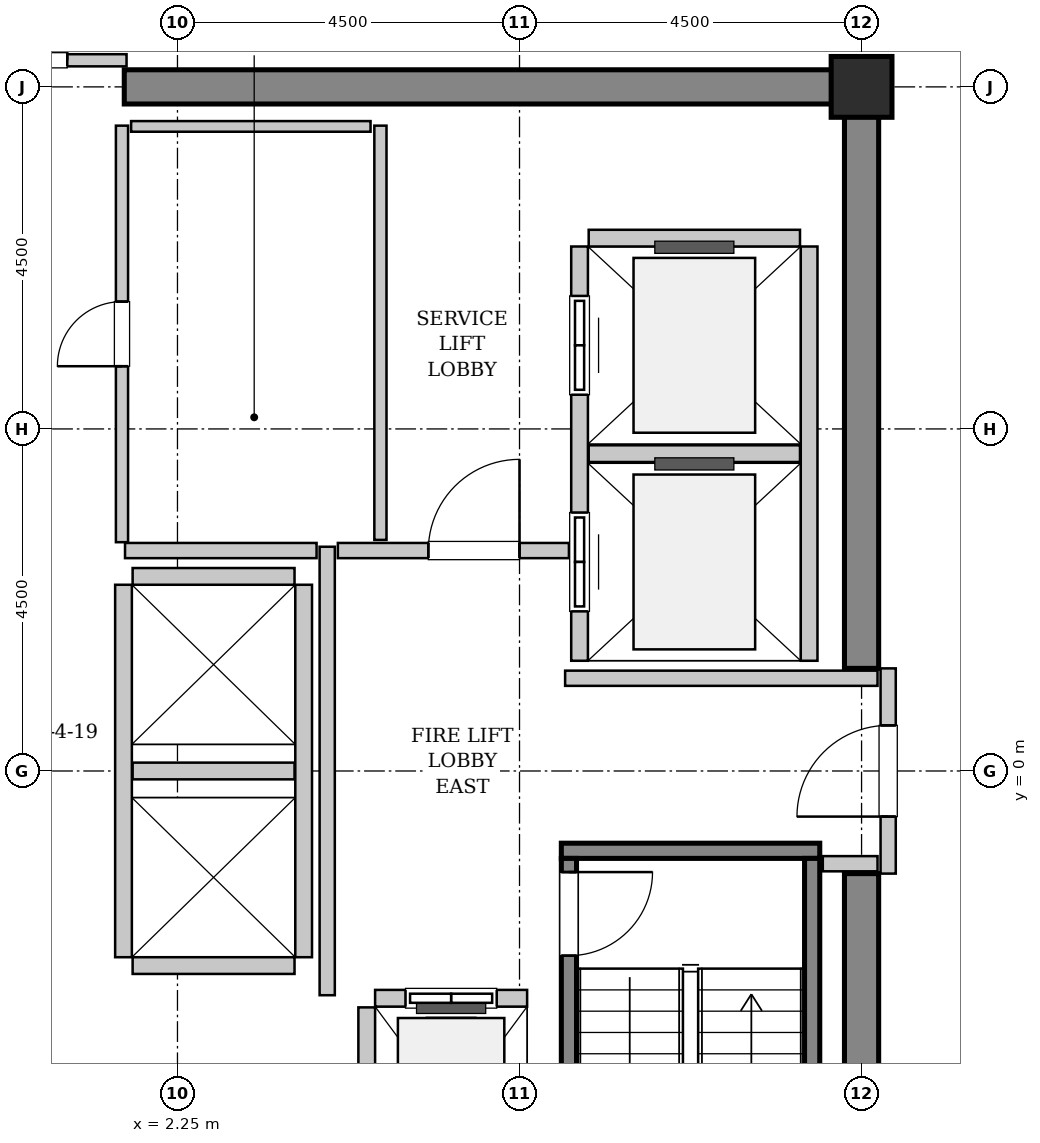
"""IFC4 building model, lengths in metres.
Left out: names, types, materials, properties, quantities, classifications, styles, units other than length and angle.
Written with IfcOpenShell. Run it as: python <this file> out.ifc"""

import sys

from ifc_helpers import new_model, si_unit, direction, frame, frame_2d, origin, origin_2d, place, context, subcontext, project, spatial, rectangle, hollow_rectangle, extrude, source, transform, mapped, element, fill, save


model = new_model("IFC4")
c1 = context("Model", 3, precision=1e-05, world=origin(), true_north=direction((0.0, 1.0)))
c2 = subcontext(c1, "Body", "Model", "MODEL_VIEW")
j1 = project(units=[si_unit("LENGTHUNIT", "METRE"), si_unit("PLANEANGLEUNIT", "RADIAN")], contexts=[c1])
p1 = place(None, origin())
s1 = spatial("IfcSite", under=j1, at=p1, CompositionType="ELEMENT")
p2 = place(p1, origin())
s2 = spatial("IfcBuilding", under=s1, at=p2, CompositionType="ELEMENT")
p3 = place(p2, frame((0.0, 0.0, 240.8)))
s3 = spatial("IfcBuildingStorey", under=s2, at=p3, CompositionType="ELEMENT", Elevation=240.8)
m1 = source(origin(), c2, "Body", "SweptSolid", [
    extrude(rectangle(XDim=9.925, YDim=0.45, at=frame_2d((4.962, 0.0))), origin(), (0.0, 0.0, 1.0), 3.8),
])
p4 = place(p3, frame((1.55, 9.0, 0.0), z_axis=(0.0, 0.0, 1.0), x_axis=(1.0, 0.0, 0.0)))
e1 = element("IfcWall", 1, at=p4, inside=s3, PredefinedType="SHEAR", context=c2, shape_type="MappedRepresentation", body=[
    mapped(m1, transform((0.0, 0.0, 0.0), x_axis=(1.0, 0.0, 0.0), y_axis=(0.0, 1.0, 0.0), z_axis=(0.0, 0.0, 1.0), scale=1.0)),
])
m2 = source(origin(), c2, "Body", "SweptSolid", [
    extrude(rectangle(XDim=7.425, YDim=0.45, at=frame_2d((3.712, 0.0))), origin(), (0.0, 0.0, 1.0), 3.8),
])
for number, where, z_axis, x_axis in (
    (2, (11.25, -8.775, 0.0), (0.0, 0.0, 1.0), (0.0, 1.0, 0.0)),
    (3, (11.25, 1.35, 0.0), (0.0, 0.0, 1.0), (0.0, 1.0, 0.0)),
):
    element("IfcWall", number, at=place(p3, frame(where, z_axis=z_axis, x_axis=x_axis)), inside=s3, PredefinedType="SHEAR", context=c2, shape_type="MappedRepresentation", body=[
        mapped(m2, transform((0.0, 0.0, 0.0), x_axis=(1.0, 0.0, 0.0), y_axis=(0.0, 1.0, 0.0), z_axis=(0.0, 0.0, 1.0), scale=1.0)),
    ])
m3 = source(origin(), c2, "Body", "SweptSolid", [
    extrude(hollow_rectangle(XDim=0.8, YDim=0.8, WallThickness=0.04, InnerFilletRadius=0.04, OuterFilletRadius=0.08, at=origin_2d()), origin(), (0.0, 0.0, 1.0), 3.8),
])
p5 = place(p3, frame((11.25, 9.0, 0.0), z_axis=(0.0, 0.0, 1.0), x_axis=(1.0, 0.0, 0.0)))
e4 = element("IfcColumn", 4, at=p5, inside=s3, PredefinedType="COLUMN", context=c2, shape_type="MappedRepresentation", body=[
    mapped(m3, transform((0.0, 0.0, 0.0), x_axis=(1.0, 0.0, 0.0), y_axis=(0.0, 1.0, 0.0), z_axis=(0.0, 0.0, 1.0), scale=1.0)),
])
m4 = source(origin(), c2, "Body", "SweptSolid", [
    extrude(rectangle(XDim=3.4, YDim=0.2, at=frame_2d((1.7, 0.0))), origin(), (0.0, 0.0, 1.0), 3.8),
])
p6 = place(p3, frame((7.3, -1.05, 0.0), z_axis=(0.0, 0.0, 1.0), x_axis=(1.0, 0.0, 0.0)))
e5 = element("IfcWall", 5, at=p6, inside=s3, PredefinedType="SOLIDWALL", context=c2, shape_type="MappedRepresentation", body=[
    mapped(m4, transform((0.0, 0.0, 0.0), x_axis=(1.0, 0.0, 0.0), y_axis=(0.0, 1.0, 0.0), z_axis=(0.0, 0.0, 1.0), scale=1.0)),
])
m5 = source(origin(), c2, "Body", "SweptSolid", [
    extrude(rectangle(XDim=7.1, YDim=0.2, at=frame_2d((3.55, 0.0))), origin(), (0.0, 0.0, 1.0), 3.8),
])
p7 = place(p3, frame((7.4, -1.15, 0.0), z_axis=(0.0, 0.0, 1.0), x_axis=(0.0, -1.0, 0.0)))
e6 = element("IfcWall", 6, at=p7, inside=s3, PredefinedType="SOLIDWALL", context=c2, shape_type="MappedRepresentation", body=[
    mapped(m5, transform((0.0, 0.0, 0.0), x_axis=(1.0, 0.0, 0.0), y_axis=(0.0, 1.0, 0.0), z_axis=(0.0, 0.0, 1.0), scale=1.0)),
])
p8 = place(p7, frame((0.18, 0.0, 0.0)))
e7 = element("IfcOpeningElement", 7, at=p8, cuts=e6, PredefinedType="OPENING", context=c2, shape_type="SweptSolid", body=[
    extrude(rectangle(XDim=1.1, YDim=2.15, at=frame_2d((0.55, 1.075))), frame((0.0, 0.11, 0.0), z_axis=(0.0, -1.0, 0.0), x_axis=(1.0, 0.0, 0.0)), (0.0, 0.0, 1.0), 0.22),
])
p9 = place(p3, frame((10.6, -1.15, 0.0), z_axis=(0.0, 0.0, 1.0), x_axis=(0.0, -1.0, 0.0)))
e8 = element("IfcWall", 8, at=p9, inside=s3, PredefinedType="SOLIDWALL", context=c2, shape_type="MappedRepresentation", body=[
    mapped(m5, transform((0.0, 0.0, 0.0), x_axis=(1.0, 0.0, 0.0), y_axis=(0.0, 1.0, 0.0), z_axis=(0.0, 0.0, 1.0), scale=1.0)),
])
m6 = source(origin(), c2, "Body", "SweptSolid", [
    extrude(rectangle(XDim=2.0, YDim=0.22, at=frame_2d((1.0, 0.0))), origin(), (0.0, 0.0, 1.0), 3.535),
])
p10 = place(p3, frame((6.85, -2.99, 0.0), z_axis=(0.0, 0.0, 1.0), x_axis=(-1.0, 0.0, 0.0)))
e9 = element("IfcWall", 9, at=p10, inside=s3, PredefinedType="SOLIDWALL", context=c2, shape_type="MappedRepresentation", body=[
    mapped(m6, transform((0.0, 0.0, 0.0), x_axis=(1.0, 0.0, 0.0), y_axis=(0.0, 1.0, 0.0), z_axis=(0.0, 0.0, 1.0), scale=1.0)),
])
p11 = place(p10, frame((0.4, 0.0, 0.0)))
e10 = element("IfcOpeningElement", 10, at=p11, cuts=e9, PredefinedType="OPENING", context=c2, shape_type="SweptSolid", body=[
    extrude(rectangle(XDim=1.2, YDim=2.2, at=frame_2d((0.6, 1.1))), frame((0.0, 0.12, 0.0), z_axis=(0.0, -1.0, 0.0), x_axis=(1.0, 0.0, 0.0)), (0.0, 0.0, 1.0), 0.24),
])
m7 = source(origin(), c2, "Body", "SweptSolid", [
    extrude(rectangle(XDim=2.68, YDim=0.22, at=frame_2d((1.34, 0.0))), origin(), (0.0, 0.0, 1.0), 3.535),
])
p12 = place(p3, frame((4.74, -3.11, 0.0), z_axis=(0.0, 0.0, 1.0), x_axis=(0.0, -1.0, 0.0)))
e11 = element("IfcWall", 11, at=p12, inside=s3, PredefinedType="SOLIDWALL", context=c2, shape_type="MappedRepresentation", body=[
    mapped(m7, transform((0.0, 0.0, 0.0), x_axis=(1.0, 0.0, 0.0), y_axis=(0.0, 1.0, 0.0), z_axis=(0.0, 0.0, 1.0), scale=1.0)),
])
m8 = source(origin(), c2, "Body", "SweptSolid", [
    extrude(rectangle(XDim=5.45, YDim=0.22, at=frame_2d((2.725, 0.0))), origin(), (0.0, 0.0, 1.0), 3.535),
])
p13 = place(p3, frame((7.54, 6.9, 0.0), z_axis=(0.0, 0.0, 1.0), x_axis=(0.0, -1.0, 0.0)))
e12 = element("IfcWall", 12, at=p13, inside=s3, PredefinedType="SOLIDWALL", context=c2, shape_type="MappedRepresentation", body=[
    mapped(m8, transform((0.0, 0.0, 0.0), x_axis=(1.0, 0.0, 0.0), y_axis=(0.0, 1.0, 0.0), z_axis=(0.0, 0.0, 1.0), scale=1.0)),
])
p14 = place(p13, frame((3.5, 0.0, 0.0)))
e13 = element("IfcOpeningElement", 13, at=p14, cuts=e12, PredefinedType="OPENING", context=c2, shape_type="SweptSolid", body=[
    extrude(rectangle(XDim=1.3, YDim=2.3, at=frame_2d((0.65, 1.15))), frame((0.0, 0.12, 0.0), z_axis=(0.0, -1.0, 0.0), x_axis=(1.0, 0.0, 0.0)), (0.0, 0.0, 1.0), 0.24),
])
p15 = place(p13, frame((0.65, 0.0, 0.0)))
e14 = element("IfcOpeningElement", 14, at=p15, cuts=e12, PredefinedType="OPENING", context=c2, shape_type="SweptSolid", body=[
    extrude(rectangle(XDim=1.3, YDim=2.3, at=frame_2d((0.65, 1.15))), frame((0.0, 0.12, 0.0), z_axis=(0.0, -1.0, 0.0), x_axis=(1.0, 0.0, 0.0)), (0.0, 0.0, 1.0), 0.24),
])
p16 = place(p3, frame((10.56, 1.45, 0.0), z_axis=(0.0, 0.0, 1.0), x_axis=(0.0, 1.0, 0.0)))
e15 = element("IfcWall", 15, at=p16, inside=s3, PredefinedType="SOLIDWALL", context=c2, shape_type="MappedRepresentation", body=[
    mapped(m8, transform((0.0, 0.0, 0.0), x_axis=(1.0, 0.0, 0.0), y_axis=(0.0, 1.0, 0.0), z_axis=(0.0, 0.0, 1.0), scale=1.0)),
])
m9 = source(origin(), c2, "Body", "SweptSolid", [
    extrude(rectangle(XDim=2.78, YDim=0.22, at=frame_2d((1.39, 0.0))), origin(), (0.0, 0.0, 1.0), 3.535),
])
for number, where, z_axis, x_axis in (
    (16, (7.66, 4.175, 0.0), (0.0, 0.0, 1.0), (1.0, 0.0, 0.0)),
    (17, (10.44, 7.01, 0.0), (0.0, 0.0, 1.0), (-1.0, 0.0, 0.0)),
):
    element("IfcWall", number, at=place(p3, frame(where, z_axis=z_axis, x_axis=x_axis)), inside=s3, PredefinedType="SOLIDWALL", context=c2, shape_type="MappedRepresentation", body=[
        mapped(m9, transform((0.0, 0.0, 0.0), x_axis=(1.0, 0.0, 0.0), y_axis=(0.0, 1.0, 0.0), z_axis=(0.0, 0.0, 1.0), scale=1.0)),
    ])
m10 = source(origin(), c2, "Body", "SweptSolid", [
    extrude(rectangle(XDim=4.9, YDim=0.22, at=frame_2d((2.45, 0.0))), origin(), (0.0, 0.0, 1.0), 3.535),
])
for number, where, z_axis, x_axis in (
    (18, (1.54, 2.45, 0.0), (0.0, 0.0, 1.0), (0.0, -1.0, 0.0)),
    (19, (3.91, -2.45, 0.0), (0.0, 0.0, 1.0), (0.0, 1.0, 0.0)),
):
    element("IfcWall", number, at=place(p3, frame(where, z_axis=z_axis, x_axis=x_axis)), inside=s3, PredefinedType="SOLIDWALL", context=c2, shape_type="MappedRepresentation", body=[
        mapped(m10, transform((0.0, 0.0, 0.0), x_axis=(1.0, 0.0, 0.0), y_axis=(0.0, 1.0, 0.0), z_axis=(0.0, 0.0, 1.0), scale=1.0)),
    ])
m11 = source(origin(), c2, "Body", "SweptSolid", [
    extrude(rectangle(XDim=2.13, YDim=0.22, at=frame_2d((1.065, 0.0))), origin(), (0.0, 0.0, 1.0), 3.535),
])
for number, where, z_axis, x_axis in (
    (20, (1.66, -2.56, 0.0), (0.0, 0.0, 1.0), (1.0, 0.0, 0.0)),
    (21, (1.66, 0.0, 0.0), (0.0, 0.0, 1.0), (1.0, 0.0, 0.0)),
    (22, (3.79, 2.56, 0.0), (0.0, 0.0, 1.0), (-1.0, 0.0, 0.0)),
):
    element("IfcWall", number, at=place(p3, frame(where, z_axis=z_axis, x_axis=x_axis)), inside=s3, PredefinedType="SOLIDWALL", context=c2, shape_type="MappedRepresentation", body=[
        mapped(m11, transform((0.0, 0.0, 0.0), x_axis=(1.0, 0.0, 0.0), y_axis=(0.0, 1.0, 0.0), z_axis=(0.0, 0.0, 1.0), scale=1.0)),
    ])
m12 = source(origin(), c2, "Body", "SweptSolid", [
    extrude(rectangle(XDim=2.7, YDim=0.2, at=frame_2d((1.35, 0.0))), origin(), (0.0, 0.0, 1.0), 2.625),
])
p17 = place(p3, frame((11.6, -1.35, 0.0), z_axis=(0.0, 0.0, 1.0), x_axis=(0.0, 1.0, 0.0)))
e23 = element("IfcWall", 23, at=p17, inside=s3, PredefinedType="PARTITIONING", context=c2, shape_type="MappedRepresentation", body=[
    mapped(m12, transform((0.0, 0.0, 0.0), x_axis=(1.0, 0.0, 0.0), y_axis=(0.0, 1.0, 0.0), z_axis=(0.0, 0.0, 1.0), scale=1.0)),
])
p18 = place(p17, frame((0.75, 0.0, 0.0)))
e24 = element("IfcOpeningElement", 24, at=p18, cuts=e23, PredefinedType="OPENING", context=c2, shape_type="SweptSolid", body=[
    extrude(rectangle(XDim=1.2, YDim=2.15, at=frame_2d((0.6, 1.075))), frame((0.0, 0.11, 0.0), z_axis=(0.0, -1.0, 0.0), x_axis=(1.0, 0.0, 0.0)), (0.0, 0.0, 1.0), 0.22),
])
m13 = source(origin(), c2, "Body", "SweptSolid", [
    extrude(rectangle(XDim=5.9, YDim=0.2, at=frame_2d((2.95, 0.0))), origin(), (0.0, 0.0, 1.0), 3.535),
])
p19 = place(p3, frame((4.22, -2.95, 0.0), z_axis=(0.0, 0.0, 1.0), x_axis=(0.0, 1.0, 0.0)))
e25 = element("IfcWall", 25, at=p19, inside=s3, PredefinedType="PARTITIONING", context=c2, shape_type="MappedRepresentation", body=[
    mapped(m13, transform((0.0, 0.0, 0.0), x_axis=(1.0, 0.0, 0.0), y_axis=(0.0, 1.0, 0.0), z_axis=(0.0, 0.0, 1.0), scale=1.0)),
])
m14 = source(origin(), c2, "Body", "SweptSolid", [
    extrude(rectangle(XDim=2.52, YDim=0.2, at=frame_2d((1.26, 0.0))), origin(), (0.0, 0.0, 1.0), 3.535),
])
p20 = place(p3, frame((1.56, 2.9, 0.0), z_axis=(0.0, 0.0, 1.0), x_axis=(1.0, 0.0, 0.0)))
e26 = element("IfcWall", 26, at=p20, inside=s3, PredefinedType="PARTITIONING", context=c2, shape_type="MappedRepresentation", body=[
    mapped(m14, transform((0.0, 0.0, 0.0), x_axis=(1.0, 0.0, 0.0), y_axis=(0.0, 1.0, 0.0), z_axis=(0.0, 0.0, 1.0), scale=1.0)),
])
m15 = source(origin(), c2, "Body", "SweptSolid", [
    extrude(rectangle(XDim=3.04, YDim=0.2, at=frame_2d((1.52, 0.0))), origin(), (0.0, 0.0, 1.0), 3.535),
])
p21 = place(p3, frame((4.36, 2.9, 0.0), z_axis=(0.0, 0.0, 1.0), x_axis=(1.0, 0.0, 0.0)))
e27 = element("IfcWall", 27, at=p21, inside=s3, PredefinedType="PARTITIONING", context=c2, shape_type="MappedRepresentation", body=[
    mapped(m15, transform((0.0, 0.0, 0.0), x_axis=(1.0, 0.0, 0.0), y_axis=(0.0, 1.0, 0.0), z_axis=(0.0, 0.0, 1.0), scale=1.0)),
])
p22 = place(p21, frame((1.19, 0.0, 0.0)))
e28 = element("IfcOpeningElement", 28, at=p22, cuts=e27, PredefinedType="OPENING", context=c2, shape_type="SweptSolid", body=[
    extrude(rectangle(XDim=1.2, YDim=2.15, at=frame_2d((0.6, 1.075))), frame((0.0, 0.11, 0.0), z_axis=(0.0, -1.0, 0.0), x_axis=(1.0, 0.0, 0.0)), (0.0, 0.0, 1.0), 0.22),
])
m16 = source(origin(), c2, "Body", "SweptSolid", [
    extrude(rectangle(XDim=4.11, YDim=0.2, at=frame_2d((2.055, 0.0))), origin(), (0.0, 0.0, 1.0), 3.535),
])
p23 = place(p3, frame((7.35, 1.22, 0.0), z_axis=(0.0, 0.0, 1.0), x_axis=(1.0, 0.0, 0.0)))
e29 = element("IfcWall", 29, at=p23, inside=s3, PredefinedType="PARTITIONING", context=c2, shape_type="MappedRepresentation", body=[
    mapped(m16, transform((0.0, 0.0, 0.0), x_axis=(1.0, 0.0, 0.0), y_axis=(0.0, 1.0, 0.0), z_axis=(0.0, 0.0, 1.0), scale=1.0)),
])
m17 = source(origin(), c2, "Body", "SweptSolid", [
    extrude(rectangle(XDim=0.72, YDim=0.2, at=frame_2d((0.36, 0.0))), origin(), (0.0, 0.0, 1.0), 3.535),
])
p24 = place(p3, frame((10.74, -1.22, 0.0), z_axis=(0.0, 0.0, 1.0), x_axis=(1.0, 0.0, 0.0)))
e30 = element("IfcWall", 30, at=p24, inside=s3, PredefinedType="PARTITIONING", context=c2, shape_type="MappedRepresentation", body=[
    mapped(m17, transform((0.0, 0.0, 0.0), x_axis=(1.0, 0.0, 0.0), y_axis=(0.0, 1.0, 0.0), z_axis=(0.0, 0.0, 1.0), scale=1.0)),
])
m18 = source(origin(), c2, "Body", "SweptSolid", [
    extrude(rectangle(XDim=3.16, YDim=0.16, at=frame_2d((1.58, 0.0))), origin(), (0.0, 0.0, 1.0), 2.625),
])
p25 = place(p3, frame((-1.58, 9.35, 0.0), z_axis=(0.0, 0.0, 1.0), x_axis=(1.0, 0.0, 0.0)))
e31 = element("IfcWall", 31, at=p25, inside=s3, PredefinedType="PARTITIONING", context=c2, shape_type="MappedRepresentation", body=[
    mapped(m18, transform((0.0, 0.0, 0.0), x_axis=(1.0, 0.0, 0.0), y_axis=(0.0, 1.0, 0.0), z_axis=(0.0, 0.0, 1.0), scale=1.0)),
])
p26 = place(p25, frame((0.78, 0.0, 0.0)))
e32 = element("IfcOpeningElement", 32, at=p26, cuts=e31, PredefinedType="OPENING", context=c2, shape_type="SweptSolid", body=[
    extrude(rectangle(XDim=1.6, YDim=2.3, at=frame_2d((0.8, 1.15))), frame((0.0, 0.09, 0.0), z_axis=(0.0, -1.0, 0.0), x_axis=(1.0, 0.0, 0.0)), (0.0, 0.0, 1.0), 0.18),
])
m19 = source(origin(), c2, "Body", "SweptSolid", [
    extrude(rectangle(XDim=5.45, YDim=0.16, at=frame_2d((2.725, 0.0))), origin(), (0.0, 0.0, 1.0), 3.535),
])
p27 = place(p3, frame((4.92, 3.04, 0.0), z_axis=(0.0, 0.0, 1.0), x_axis=(0.0, 1.0, 0.0)))
e33 = element("IfcWall", 33, at=p27, inside=s3, PredefinedType="PARTITIONING", context=c2, shape_type="MappedRepresentation", body=[
    mapped(m19, transform((0.0, 0.0, 0.0), x_axis=(1.0, 0.0, 0.0), y_axis=(0.0, 1.0, 0.0), z_axis=(0.0, 0.0, 1.0), scale=1.0)),
])
m20 = source(origin(), c2, "Body", "SweptSolid", [
    extrude(rectangle(XDim=5.48, YDim=0.16, at=frame_2d((2.74, 0.0))), origin(), (0.0, 0.0, 1.0), 3.535),
])
p28 = place(p3, frame((1.52, 3.01, 0.0), z_axis=(0.0, 0.0, 1.0), x_axis=(0.0, 1.0, 0.0)))
e34 = element("IfcWall", 34, at=p28, inside=s3, PredefinedType="PARTITIONING", context=c2, shape_type="MappedRepresentation", body=[
    mapped(m20, transform((0.0, 0.0, 0.0), x_axis=(1.0, 0.0, 0.0), y_axis=(0.0, 1.0, 0.0), z_axis=(0.0, 0.0, 1.0), scale=1.0)),
])
p29 = place(p28, frame((2.315, 0.0, 0.0)))
e35 = element("IfcOpeningElement", 35, at=p29, cuts=e34, PredefinedType="OPENING", context=c2, shape_type="SweptSolid", body=[
    extrude(rectangle(XDim=0.85, YDim=2.1, at=frame_2d((0.425, 1.05))), frame((0.0, 0.09, 0.0), z_axis=(0.0, -1.0, 0.0), x_axis=(1.0, 0.0, 0.0)), (0.0, 0.0, 1.0), 0.18),
])
m21 = source(origin(), c2, "Body", "SweptSolid", [
    extrude(rectangle(XDim=3.15, YDim=0.14, at=frame_2d((1.575, 0.0))), origin(), (0.0, 0.0, 1.0), 3.535),
])
p30 = place(p3, frame((1.64, 8.48, 0.0), z_axis=(0.0, 0.0, 1.0), x_axis=(1.0, 0.0, 0.0)))
e36 = element("IfcWall", 36, at=p30, inside=s3, PredefinedType="PARTITIONING", context=c2, shape_type="MappedRepresentation", body=[
    mapped(m21, transform((0.0, 0.0, 0.0), x_axis=(1.0, 0.0, 0.0), y_axis=(0.0, 1.0, 0.0), z_axis=(0.0, 0.0, 1.0), scale=1.0)),
])
m22 = source(origin(), c2, "Body", "SweptSolid", [
    extrude(rectangle(XDim=1.1, YDim=2.15, at=frame_2d((0.55, 1.075))), frame((0.0, 0.025, 0.0), z_axis=(0.0, -1.0, 0.0), x_axis=(1.0, 0.0, 0.0)), (0.0, 0.0, 1.0), 0.05),
])
p31 = place(p8, origin())
e37 = element("IfcDoor", 37, at=p31, inside=s3, OperationType="SINGLE_SWING_LEFT", PredefinedType="DOOR", context=c2, shape_type="MappedRepresentation", body=[
    mapped(m22, transform((0.0, 0.0, 0.0), x_axis=(1.0, 0.0, 0.0), y_axis=(0.0, 1.0, 0.0), z_axis=(0.0, 0.0, 1.0), scale=1.0)),
])
fill(e7, e37)
m23 = source(origin(), c2, "Body", "SweptSolid", [
    extrude(rectangle(XDim=1.2, YDim=2.2, at=frame_2d((0.6, 1.1))), frame((0.0, 0.025, 0.0), z_axis=(0.0, -1.0, 0.0), x_axis=(1.0, 0.0, 0.0)), (0.0, 0.0, 1.0), 0.05),
])
p32 = place(p11, origin())
e38 = element("IfcDoor", 38, at=p32, inside=s3, OperationType="SLIDING_TO_LEFT", PredefinedType="DOOR", context=c2, shape_type="MappedRepresentation", body=[
    mapped(m23, transform((0.0, 0.0, 0.0), x_axis=(1.0, 0.0, 0.0), y_axis=(0.0, 1.0, 0.0), z_axis=(0.0, 0.0, 1.0), scale=1.0)),
])
fill(e10, e38)
m24 = source(origin(), c2, "Body", "SweptSolid", [
    extrude(rectangle(XDim=1.3, YDim=2.3, at=frame_2d((0.65, 1.15))), frame((0.0, 0.025, 0.0), z_axis=(0.0, -1.0, 0.0), x_axis=(1.0, 0.0, 0.0)), (0.0, 0.0, 1.0), 0.05),
])
p33 = place(p14, origin())
e39 = element("IfcDoor", 39, at=p33, inside=s3, OperationType="SLIDING_TO_RIGHT", PredefinedType="DOOR", context=c2, shape_type="MappedRepresentation", body=[
    mapped(m24, transform((0.0, 0.0, 0.0), x_axis=(1.0, 0.0, 0.0), y_axis=(0.0, 1.0, 0.0), z_axis=(0.0, 0.0, 1.0), scale=1.0)),
])
fill(e13, e39)
p34 = place(p15, origin())
e40 = element("IfcDoor", 40, at=p34, inside=s3, OperationType="SLIDING_TO_RIGHT", PredefinedType="DOOR", context=c2, shape_type="MappedRepresentation", body=[
    mapped(m24, transform((0.0, 0.0, 0.0), x_axis=(1.0, 0.0, 0.0), y_axis=(0.0, 1.0, 0.0), z_axis=(0.0, 0.0, 1.0), scale=1.0)),
])
fill(e14, e40)
m25 = source(origin(), c2, "Body", "SweptSolid", [
    extrude(rectangle(XDim=1.2, YDim=2.15, at=frame_2d((0.6, 1.075))), frame((0.0, 0.025, 0.0), z_axis=(0.0, -1.0, 0.0), x_axis=(1.0, 0.0, 0.0)), (0.0, 0.0, 1.0), 0.05),
])
p35 = place(p18, origin())
e41 = element("IfcDoor", 41, at=p35, inside=s3, OperationType="SINGLE_SWING_LEFT", PredefinedType="DOOR", context=c2, shape_type="MappedRepresentation", body=[
    mapped(m25, transform((0.0, 0.0, 0.0), x_axis=(1.0, 0.0, 0.0), y_axis=(0.0, 1.0, 0.0), z_axis=(0.0, 0.0, 1.0), scale=1.0)),
])
fill(e24, e41)
p36 = place(p22, origin())
e42 = element("IfcDoor", 42, at=p36, inside=s3, OperationType="SINGLE_SWING_RIGHT", PredefinedType="DOOR", context=c2, shape_type="MappedRepresentation", body=[
    mapped(m25, transform((0.0, 0.0, 0.0), x_axis=(1.0, 0.0, 0.0), y_axis=(0.0, 1.0, 0.0), z_axis=(0.0, 0.0, 1.0), scale=1.0)),
])
fill(e28, e42)
m26 = source(origin(), c2, "Body", "SweptSolid", [
    extrude(rectangle(XDim=1.6, YDim=2.3, at=frame_2d((0.8, 1.15))), frame((0.0, 0.025, 0.0), z_axis=(0.0, -1.0, 0.0), x_axis=(1.0, 0.0, 0.0)), (0.0, 0.0, 1.0), 0.05),
])
p37 = place(p26, origin())
e43 = element("IfcDoor", 43, at=p37, inside=s3, OperationType="DOUBLE_DOOR_SINGLE_SWING", PredefinedType="DOOR", context=c2, shape_type="MappedRepresentation", body=[
    mapped(m26, transform((0.0, 0.0, 0.0), x_axis=(1.0, 0.0, 0.0), y_axis=(0.0, 1.0, 0.0), z_axis=(0.0, 0.0, 1.0), scale=1.0)),
])
fill(e32, e43)
m27 = source(origin(), c2, "Body", "SweptSolid", [
    extrude(rectangle(XDim=0.85, YDim=2.1, at=frame_2d((0.425, 1.05))), frame((0.0, 0.025, 0.0), z_axis=(0.0, -1.0, 0.0), x_axis=(1.0, 0.0, 0.0)), (0.0, 0.0, 1.0), 0.05),
])
p38 = place(p29, origin())
e44 = element("IfcDoor", 44, at=p38, inside=s3, OperationType="SINGLE_SWING_LEFT", PredefinedType="DOOR", context=c2, shape_type="MappedRepresentation", body=[
    mapped(m27, transform((0.0, 0.0, 0.0), x_axis=(1.0, 0.0, 0.0), y_axis=(0.0, 1.0, 0.0), z_axis=(0.0, 0.0, 1.0), scale=1.0)),
])
fill(e35, e44)
save(model, sys.argv[1])
